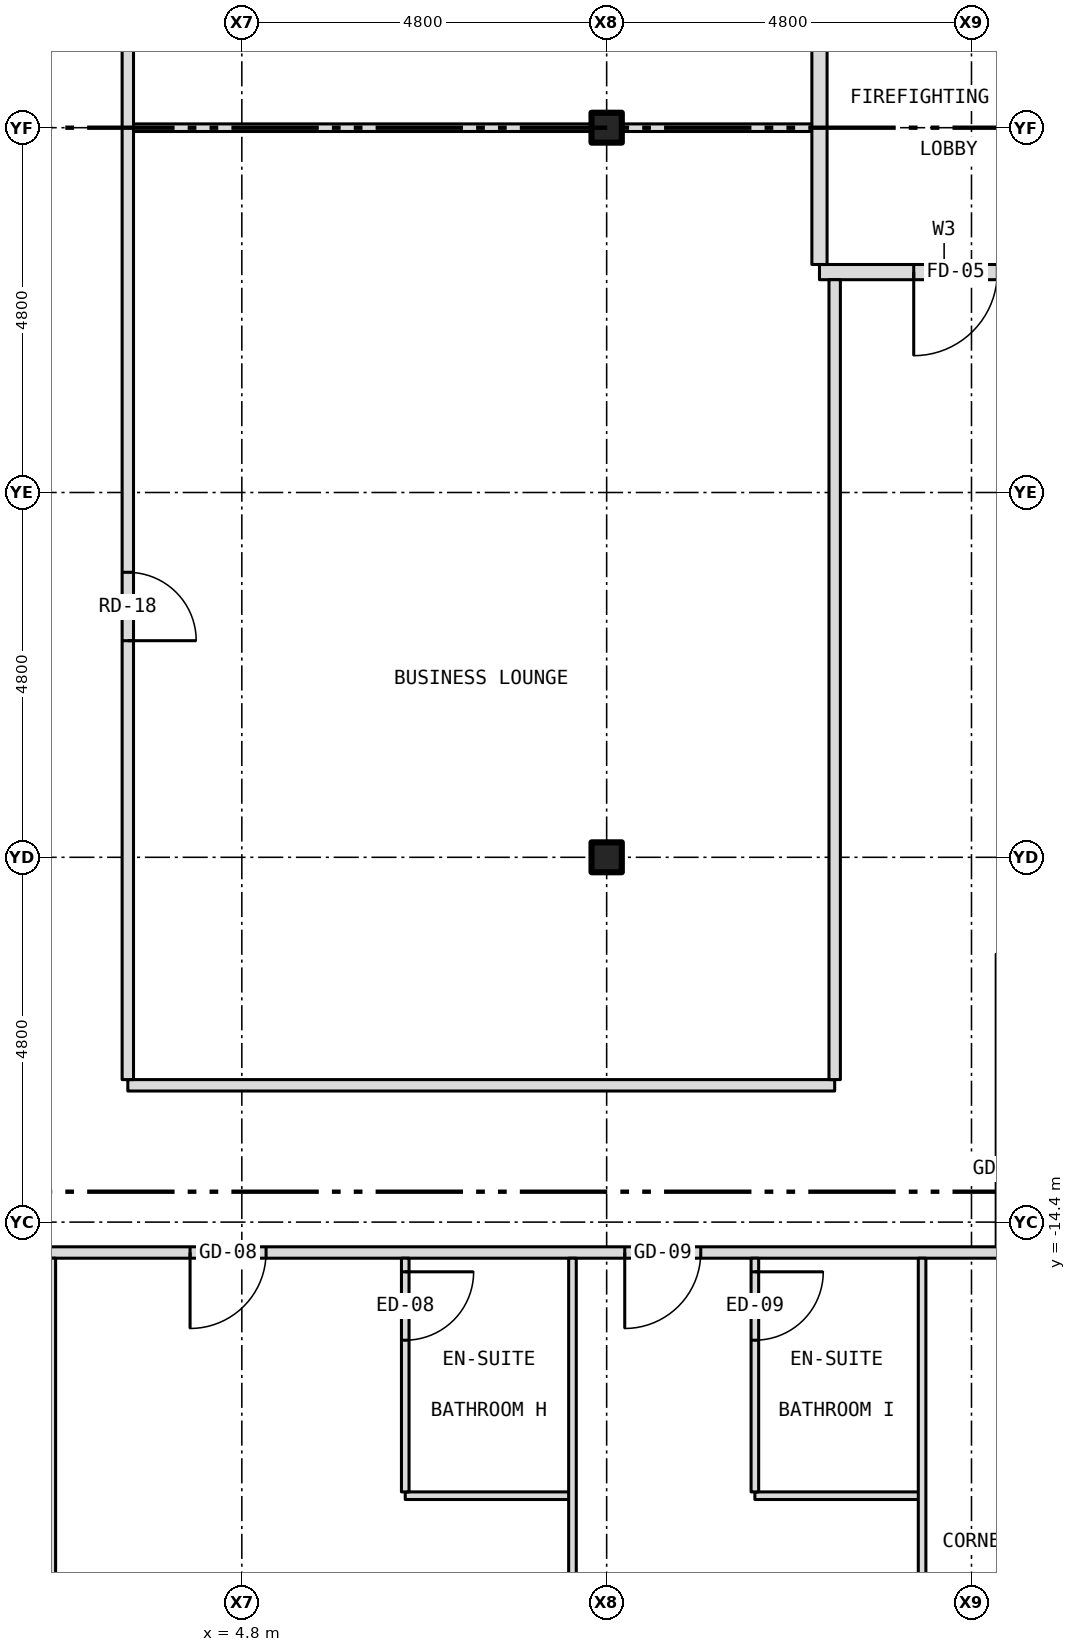
"""IFC4 building model, lengths in metres.
Left out: names, types, materials, properties, quantities, classifications, styles, units other than length and angle.
Written with IfcOpenShell. Run it as: python <this file> out.ifc"""

import sys

from ifc_helpers import new_model, si_unit, direction, frame, frame_2d, origin, origin_2d, place, context, subcontext, project, spatial, rectangle, i_section, extrude, element, fill, save


model = new_model("IFC4")
c1 = context("Model", 3, precision=1e-05, world=origin(), true_north=direction((0.0, 1.0)))
c2 = subcontext(c1, "Body", "Model", "MODEL_VIEW")
j1 = project(units=[si_unit("LENGTHUNIT", "METRE"), si_unit("PLANEANGLEUNIT", "RADIAN")], contexts=[c1])
p1 = place(None, origin())
s1 = spatial("IfcSite", under=j1, at=p1, CompositionType="ELEMENT")
p2 = place(p1, origin())
s2 = spatial("IfcBuilding", under=s1, at=p2, CompositionType="ELEMENT")
p3 = place(p2, frame((0.0, 0.0, 89.0)))
s3 = spatial("IfcBuildingStorey", under=s2, at=p3, CompositionType="ELEMENT", Elevation=89.0)
for number, where, z_axis, x_axis in (
    (1, (9.6, -9.6, -0.15), (0.0, 0.0, 1.0), (1.0, 0.0, 0.0)),
    (2, (9.6, 0.0, -0.15), (0.0, 0.0, 1.0), (1.0, 0.0, 0.0)),
):
    element("IfcColumn", number, at=place(p3, frame(where, z_axis=z_axis, x_axis=x_axis)), inside=s3, PredefinedType="COLUMN", context=c2, shape_type="SweptSolid", body=[
        extrude(i_section(OverallWidth=0.399, OverallDepth=0.394, WebThickness=0.023, FlangeThickness=0.037, at=origin_2d()), origin(), (0.0, 0.0, 1.0), 3.5),
    ])
for number, where, z_axis, x_axis in (
    (3, (6.95, -18.0, 0.0), (0.0, 0.0, 1.0), (1.0, 0.0, 0.0)),
    (4, (11.55, -18.0, 0.0), (0.0, 0.0, 1.0), (1.0, 0.0, 0.0)),
):
    element("IfcWall", number, at=place(p3, frame(where, z_axis=z_axis, x_axis=x_axis)), inside=s3, PredefinedType="PARTITIONING", context=c2, shape_type="SweptSolid", body=[
        extrude(rectangle(XDim=2.2, YDim=0.1, at=frame_2d((1.1, 0.0))), origin(), (0.0, 0.0, 1.0), 3.35),
    ])
p4 = place(p3, frame((-14.8, -14.8, 0.0), z_axis=(0.0, 0.0, 1.0), x_axis=(1.0, 0.0, 0.0)))
e5 = element("IfcWall", 5, at=p4, inside=s3, PredefinedType="PARTITIONING", context=c2, shape_type="SweptSolid", body=[
    extrude(rectangle(XDim=29.6, YDim=0.15, at=frame_2d((14.8, 0.0))), origin(), (0.0, 0.0, 1.0), 3.35),
])
p5 = place(p4, frame((2.907, 0.0, 0.0)))
e6 = element("IfcOpeningElement", 6, at=p5, cuts=e5, PredefinedType="OPENING", context=c2, shape_type="SweptSolid", body=[
    extrude(rectangle(XDim=1.0, YDim=2.1, at=frame_2d((0.5, 1.05))), frame((0.0, 0.087, 0.0), z_axis=(0.0, -1.0, 0.0), x_axis=(1.0, 0.0, 0.0)), (0.0, 0.0, 1.0), 0.174),
])
p6 = place(p4, frame((10.826, 0.0, 0.0)))
e7 = element("IfcOpeningElement", 7, at=p6, cuts=e5, PredefinedType="OPENING", context=c2, shape_type="SweptSolid", body=[
    extrude(rectangle(XDim=1.0, YDim=2.1, at=frame_2d((0.5, 1.05))), frame((0.0, 0.087, 0.0), z_axis=(0.0, -1.0, 0.0), x_axis=(1.0, 0.0, 0.0)), (0.0, 0.0, 1.0), 0.174),
])
p7 = place(p4, frame((15.401, 0.0, 0.0)))
e8 = element("IfcOpeningElement", 8, at=p7, cuts=e5, PredefinedType="OPENING", context=c2, shape_type="SweptSolid", body=[
    extrude(rectangle(XDim=1.0, YDim=2.1, at=frame_2d((0.5, 1.05))), frame((0.0, 0.087, 0.0), z_axis=(0.0, -1.0, 0.0), x_axis=(1.0, 0.0, 0.0)), (0.0, 0.0, 1.0), 0.174),
])
p8 = place(p4, frame((18.919, 0.0, 0.0)))
e9 = element("IfcOpeningElement", 9, at=p8, cuts=e5, PredefinedType="OPENING", context=c2, shape_type="SweptSolid", body=[
    extrude(rectangle(XDim=1.0, YDim=2.1, at=frame_2d((0.5, 1.05))), frame((0.0, 0.087, 0.0), z_axis=(0.0, -1.0, 0.0), x_axis=(1.0, 0.0, 0.0)), (0.0, 0.0, 1.0), 0.174),
])
p9 = place(p4, frame((24.638, 0.0, 0.0)))
e10 = element("IfcOpeningElement", 10, at=p9, cuts=e5, PredefinedType="OPENING", context=c2, shape_type="SweptSolid", body=[
    extrude(rectangle(XDim=1.0, YDim=2.1, at=frame_2d((0.5, 1.05))), frame((0.0, 0.087, 0.0), z_axis=(0.0, -1.0, 0.0), x_axis=(1.0, 0.0, 0.0)), (0.0, 0.0, 1.0), 0.174),
])
p10 = place(p3, frame((3.3, -12.6, 0.0), z_axis=(0.0, 0.0, 1.0), x_axis=(1.0, 0.0, 0.0)))
e11 = element("IfcWall", 11, at=p10, inside=s3, PredefinedType="PARTITIONING", context=c2, shape_type="SweptSolid", body=[
    extrude(rectangle(XDim=9.3, YDim=0.15, at=frame_2d((4.65, 0.0))), origin(), (0.0, 0.0, 1.0), 3.35),
])
p11 = place(p3, frame((12.4, -1.9, 0.0), z_axis=(0.0, 0.0, 1.0), x_axis=(1.0, 0.0, 0.0)))
e12 = element("IfcWall", 12, at=p11, inside=s3, PredefinedType="PARTITIONING", context=c2, shape_type="SweptSolid", body=[
    extrude(rectangle(XDim=3.28, YDim=0.2, at=frame_2d((1.64, 0.0))), origin(), (0.0, 0.0, 1.0), 3.35),
])
p12 = place(p11, frame((1.24, 0.0, 0.0)))
e13 = element("IfcOpeningElement", 13, at=p12, cuts=e12, PredefinedType="OPENING", context=c2, shape_type="SweptSolid", body=[
    extrude(rectangle(XDim=1.1, YDim=2.1, at=frame_2d((0.55, 1.05))), frame((0.0, 0.112, 0.0), z_axis=(0.0, -1.0, 0.0), x_axis=(1.0, 0.0, 0.0)), (0.0, 0.0, 1.0), 0.224),
])
p13 = place(p3, frame((3.3, 0.0, 0.0), z_axis=(0.0, 0.0, 1.0), x_axis=(1.0, 0.0, 0.0)))
e14 = element("IfcWall", 14, at=p13, inside=s3, PredefinedType="PARTITIONING", context=c2, shape_type="SweptSolid", body=[
    extrude(rectangle(XDim=6.101, YDim=0.1, at=frame_2d((3.05, 0.0))), origin(), (0.0, 0.0, 1.0), 2.728),
])
p14 = place(p3, frame((9.401, 0.0, 0.0), z_axis=(0.0, 0.0, 1.0), x_axis=(1.0, 0.0, 0.0)))
e15 = element("IfcWall", 15, at=p14, inside=s3, PredefinedType="PARTITIONING", context=c2, shape_type="SweptSolid", body=[
    extrude(rectangle(XDim=0.398, YDim=0.1, at=frame_2d((0.199, 0.0))), origin(), (0.0, 0.0, 1.0), 3.35),
])
p15 = place(p3, frame((9.799, 0.0, 0.0), z_axis=(0.0, 0.0, 1.0), x_axis=(1.0, 0.0, 0.0)))
e16 = element("IfcWall", 16, at=p15, inside=s3, PredefinedType="PARTITIONING", context=c2, shape_type="SweptSolid", body=[
    extrude(rectangle(XDim=2.601, YDim=0.1, at=frame_2d((1.3, 0.0))), origin(), (0.0, 0.0, 1.0), 2.728),
])
p16 = place(p3, frame((2.3, -23.28, 0.0), z_axis=(0.0, 0.0, 1.0), x_axis=(0.0, 1.0, 0.0)))
e17 = element("IfcWall", 17, at=p16, inside=s3, PredefinedType="PARTITIONING", context=c2, shape_type="SweptSolid", body=[
    extrude(rectangle(XDim=8.405, YDim=0.1, at=frame_2d((4.203, 0.0))), origin(), (0.0, 0.0, 1.0), 3.35),
])
p17 = place(p3, frame((3.3, -12.525, 0.0), z_axis=(0.0, 0.0, 1.0), x_axis=(0.0, 1.0, 0.0)))
e18 = element("IfcWall", 18, at=p17, inside=s3, PredefinedType="PARTITIONING", context=c2, shape_type="SweptSolid", body=[
    extrude(rectangle(XDim=18.35, YDim=0.15, at=frame_2d((9.175, 0.0))), origin(), (0.0, 0.0, 1.0), 3.35),
])
p18 = place(p17, frame((5.775, 0.0, 0.0)))
e19 = element("IfcOpeningElement", 19, at=p18, cuts=e18, PredefinedType="OPENING", context=c2, shape_type="SweptSolid", body=[
    extrude(rectangle(XDim=0.9, YDim=2.1, at=frame_2d((0.45, 1.05))), frame((0.0, 0.087, 0.0), z_axis=(0.0, -1.0, 0.0), x_axis=(1.0, 0.0, 0.0)), (0.0, 0.0, 1.0), 0.174),
])
p19 = place(p3, frame((6.95, -17.95, 0.0), z_axis=(0.0, 0.0, 1.0), x_axis=(0.0, 1.0, 0.0)))
e20 = element("IfcWall", 20, at=p19, inside=s3, PredefinedType="PARTITIONING", context=c2, shape_type="SweptSolid", body=[
    extrude(rectangle(XDim=3.075, YDim=0.1, at=frame_2d((1.538, 0.0))), origin(), (0.0, 0.0, 1.0), 3.35),
])
p20 = place(p19, frame((1.996, 0.0, 0.0)))
e21 = element("IfcOpeningElement", 21, at=p20, cuts=e20, PredefinedType="OPENING", context=c2, shape_type="SweptSolid", body=[
    extrude(rectangle(XDim=0.9, YDim=2.1, at=frame_2d((0.45, 1.05))), frame((0.0, 0.062, 0.0), z_axis=(0.0, -1.0, 0.0), x_axis=(1.0, 0.0, 0.0)), (0.0, 0.0, 1.0), 0.124),
])
p21 = place(p3, frame((9.15, -22.68, 0.0), z_axis=(0.0, 0.0, 1.0), x_axis=(0.0, 1.0, 0.0)))
e22 = element("IfcWall", 22, at=p21, inside=s3, PredefinedType="PARTITIONING", context=c2, shape_type="SweptSolid", body=[
    extrude(rectangle(XDim=7.805, YDim=0.1, at=frame_2d((3.902, 0.0))), origin(), (0.0, 0.0, 1.0), 3.35),
])
p22 = place(p3, frame((11.55, -17.95, 0.0), z_axis=(0.0, 0.0, 1.0), x_axis=(0.0, 1.0, 0.0)))
e23 = element("IfcWall", 23, at=p22, inside=s3, PredefinedType="PARTITIONING", context=c2, shape_type="SweptSolid", body=[
    extrude(rectangle(XDim=3.075, YDim=0.1, at=frame_2d((1.538, 0.0))), origin(), (0.0, 0.0, 1.0), 3.35),
])
p23 = place(p22, frame((1.996, 0.0, 0.0)))
e24 = element("IfcOpeningElement", 24, at=p23, cuts=e23, PredefinedType="OPENING", context=c2, shape_type="SweptSolid", body=[
    extrude(rectangle(XDim=0.9, YDim=2.1, at=frame_2d((0.45, 1.05))), frame((0.0, 0.062, 0.0), z_axis=(0.0, -1.0, 0.0), x_axis=(1.0, 0.0, 0.0)), (0.0, 0.0, 1.0), 0.124),
])
p24 = place(p3, frame((12.4, -1.8, 0.0), z_axis=(0.0, 0.0, 1.0), x_axis=(0.0, 1.0, 0.0)))
e25 = element("IfcWall", 25, at=p24, inside=s3, PredefinedType="PARTITIONING", context=c2, shape_type="SweptSolid", body=[
    extrude(rectangle(XDim=4.0, YDim=0.2, at=frame_2d((2.0, 0.0))), origin(), (0.0, 0.0, 1.0), 3.35),
])
p25 = place(p3, frame((12.6, -12.525, 0.0), z_axis=(0.0, 0.0, 1.0), x_axis=(0.0, 1.0, 0.0)))
e26 = element("IfcWall", 26, at=p25, inside=s3, PredefinedType="PARTITIONING", context=c2, shape_type="SweptSolid", body=[
    extrude(rectangle(XDim=10.525, YDim=0.15, at=frame_2d((5.262, 0.0))), origin(), (0.0, 0.0, 1.0), 3.35),
])
p26 = place(p3, frame((13.75, -22.68, 0.0), z_axis=(0.0, 0.0, 1.0), x_axis=(0.0, 1.0, 0.0)))
e27 = element("IfcWall", 27, at=p26, inside=s3, PredefinedType="PARTITIONING", context=c2, shape_type="SweptSolid", body=[
    extrude(rectangle(XDim=7.805, YDim=0.1, at=frame_2d((3.902, 0.0))), origin(), (0.0, 0.0, 1.0), 3.35),
])
p27 = place(p12, origin())
e28 = element("IfcDoor", 28, at=p27, inside=s3, OperationType="SINGLE_SWING_LEFT", PredefinedType="DOOR", context=c2, shape_type="SweptSolid", body=[
    extrude(rectangle(XDim=1.1, YDim=2.1, at=frame_2d((0.55, 1.05))), frame((0.0, 0.025, 0.0), z_axis=(0.0, -1.0, 0.0), x_axis=(1.0, 0.0, 0.0)), (0.0, 0.0, 1.0), 0.05),
])
fill(e13, e28)
p28 = place(p8, origin())
e29 = element("IfcDoor", 29, at=p28, inside=s3, OperationType="SINGLE_SWING_LEFT", PredefinedType="DOOR", context=c2, shape_type="SweptSolid", body=[
    extrude(rectangle(XDim=1.0, YDim=2.1, at=frame_2d((0.5, 1.05))), frame((0.0, 0.025, 0.0), z_axis=(0.0, -1.0, 0.0), x_axis=(1.0, 0.0, 0.0)), (0.0, 0.0, 1.0), 0.05),
])
fill(e9, e29)
p29 = place(p20, origin())
e30 = element("IfcDoor", 30, at=p29, inside=s3, OperationType="SINGLE_SWING_RIGHT", PredefinedType="DOOR", context=c2, shape_type="SweptSolid", body=[
    extrude(rectangle(XDim=0.9, YDim=2.1, at=frame_2d((0.45, 1.05))), frame((0.0, 0.025, 0.0), z_axis=(0.0, -1.0, 0.0), x_axis=(1.0, 0.0, 0.0)), (0.0, 0.0, 1.0), 0.05),
])
fill(e21, e30)
p30 = place(p9, origin())
e31 = element("IfcDoor", 31, at=p30, inside=s3, OperationType="SINGLE_SWING_LEFT", PredefinedType="DOOR", context=c2, shape_type="SweptSolid", body=[
    extrude(rectangle(XDim=1.0, YDim=2.1, at=frame_2d((0.5, 1.05))), frame((0.0, 0.025, 0.0), z_axis=(0.0, -1.0, 0.0), x_axis=(1.0, 0.0, 0.0)), (0.0, 0.0, 1.0), 0.05),
])
fill(e10, e31)
p31 = place(p23, origin())
e32 = element("IfcDoor", 32, at=p31, inside=s3, OperationType="SINGLE_SWING_RIGHT", PredefinedType="DOOR", context=c2, shape_type="SweptSolid", body=[
    extrude(rectangle(XDim=0.9, YDim=2.1, at=frame_2d((0.45, 1.05))), frame((0.0, 0.025, 0.0), z_axis=(0.0, -1.0, 0.0), x_axis=(1.0, 0.0, 0.0)), (0.0, 0.0, 1.0), 0.05),
])
fill(e24, e32)
p32 = place(p18, origin())
e33 = element("IfcDoor", 33, at=p32, inside=s3, OperationType="SINGLE_SWING_LEFT", PredefinedType="DOOR", context=c2, shape_type="SweptSolid", body=[
    extrude(rectangle(XDim=0.9, YDim=2.1, at=frame_2d((0.45, 1.05))), frame((0.0, 0.025, 0.0), z_axis=(0.0, -1.0, 0.0), x_axis=(1.0, 0.0, 0.0)), (0.0, 0.0, 1.0), 0.05),
])
fill(e19, e33)
save(model, sys.argv[1])
